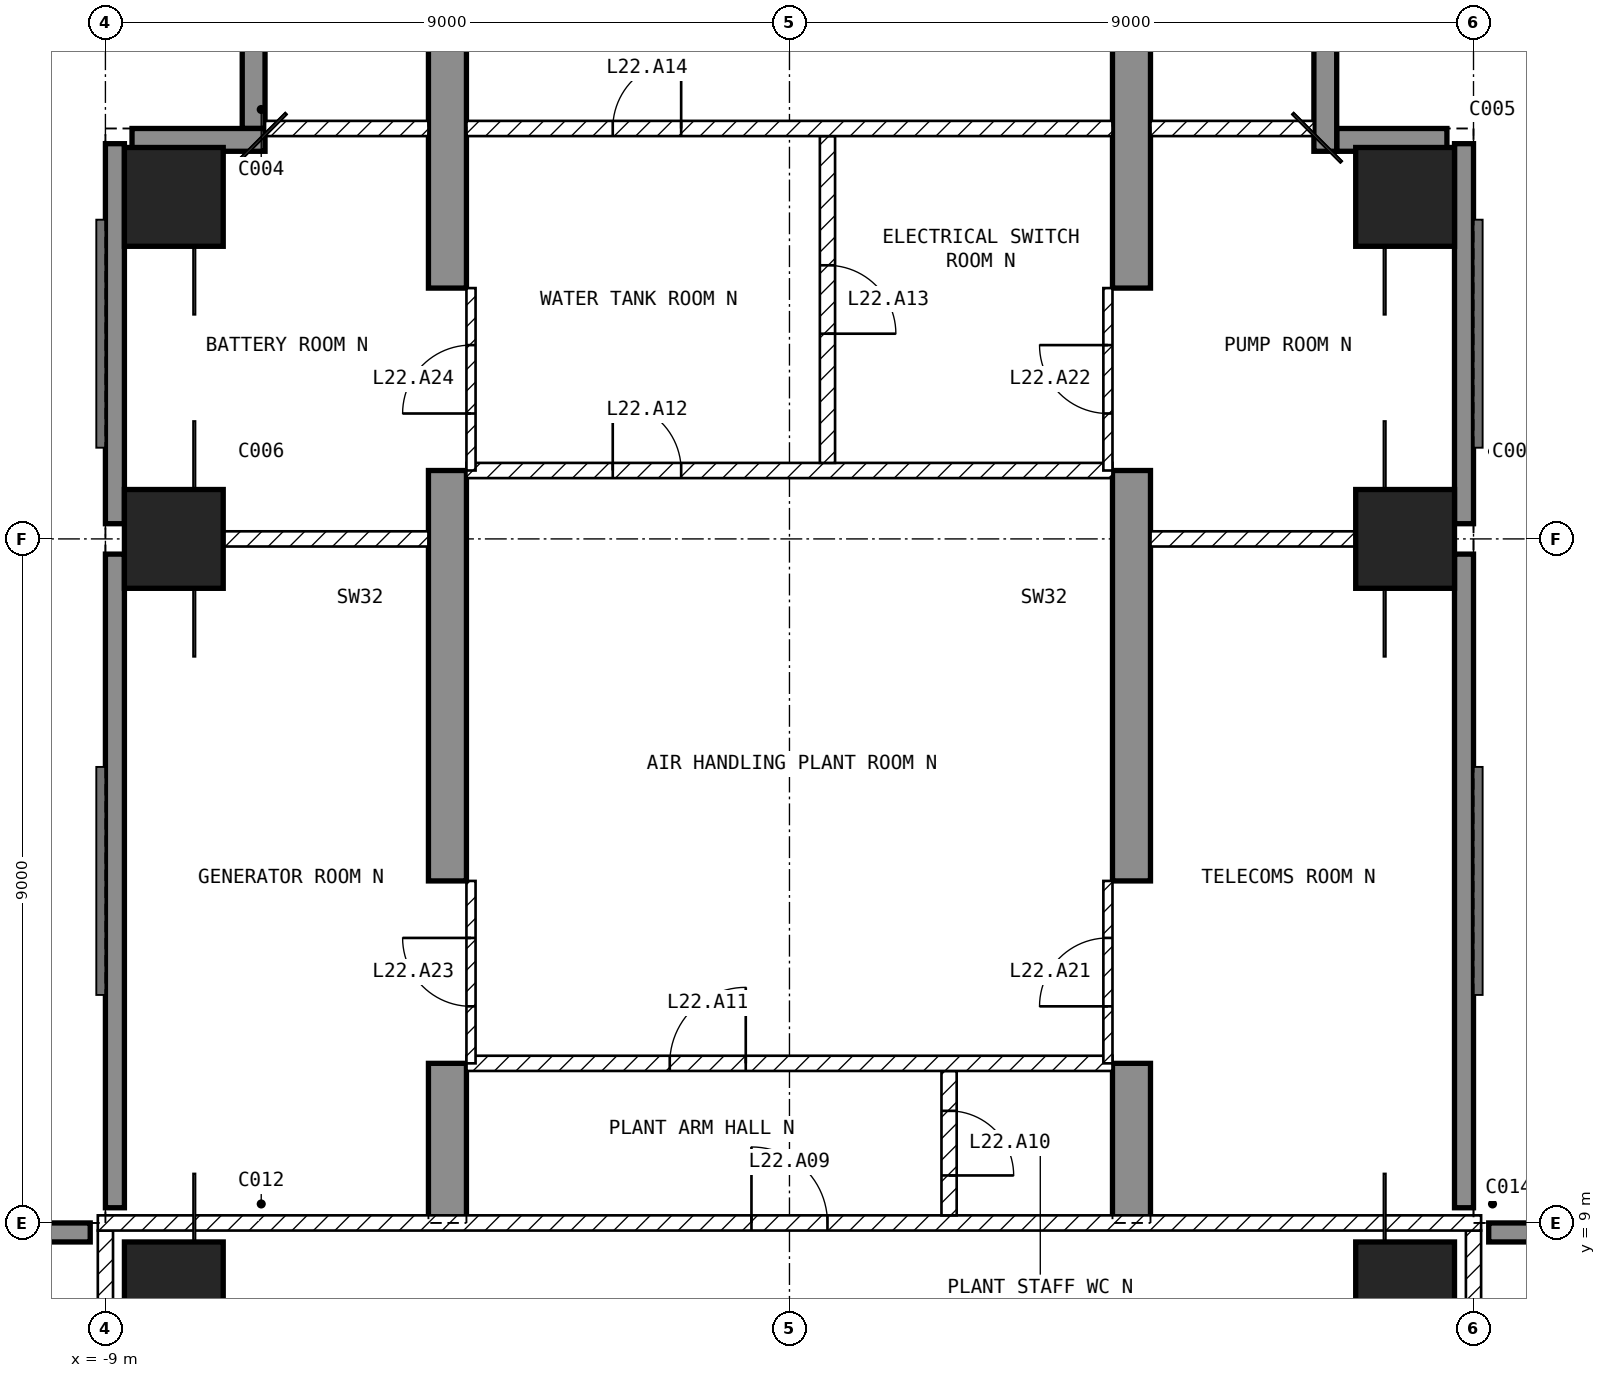
"""IFC4 building model, lengths in metres.
Left out: names, types, materials, properties, quantities, classifications, styles, units other than length and angle.
Written with IfcOpenShell. Run it as: python <this file> out.ifc"""

import sys

from ifc_helpers import new_model, si_unit, direction, frame, frame_2d, origin, origin_2d, place, context, subcontext, project, spatial, polyline, rectangle, outline, extrude, element, fill, save


model = new_model("IFC4")
c1 = context("Model", 3, precision=1e-05, world=origin(), true_north=direction((0.0, 1.0)))
c2 = subcontext(c1, "Body", "Model", "MODEL_VIEW")
j1 = project(units=[si_unit("LENGTHUNIT", "METRE"), si_unit("PLANEANGLEUNIT", "RADIAN")], contexts=[c1])
p1 = place(None, origin())
s1 = spatial("IfcSite", under=j1, at=p1, CompositionType="ELEMENT")
p2 = place(p1, origin())
s2 = spatial("IfcBuilding", under=s1, at=p2, CompositionType="ELEMENT")
p3 = place(p2, frame((0.0, 0.0, 97.9)))
s3 = spatial("IfcBuildingStorey", under=s2, at=p3, CompositionType="ELEMENT", Elevation=97.9)
for number, where, z_axis, x_axis in (
    (1, (-8.1, 8.1, -0.45), (0.0, 0.0, 1.0), (1.0, 0.0, 0.0)),
    (2, (-8.1, 18.0, -0.45), (0.0, 0.0, 1.0), (1.0, 0.0, 0.0)),
    (3, (-8.1, 22.5, -0.45), (0.0, 0.0, 1.0), (1.0, 0.0, 0.0)),
    (4, (8.1, 8.1, -0.45), (0.0, 0.0, 1.0), (1.0, 0.0, 0.0)),
    (5, (8.1, 18.0, -0.45), (0.0, 0.0, 1.0), (1.0, 0.0, 0.0)),
    (6, (8.1, 22.5, -0.45), (0.0, 0.0, 1.0), (1.0, 0.0, 0.0)),
):
    element("IfcColumn", number, at=place(p3, frame(where, z_axis=z_axis, x_axis=x_axis)), inside=s3, PredefinedType="COLUMN", context=c2, shape_type="SweptSolid", body=[
        extrude(rectangle(XDim=1.3, YDim=1.3, at=origin_2d()), origin(), (0.0, 0.0, 1.0), 4.7),
    ])
for number, where, z_axis, x_axis in (
    (7, (-4.75, 9.0, -0.45), (1.0, 0.0, 0.0), (0.0, 1.0, 0.0)),
    (8, (4.25, 9.0, -0.45), (1.0, 0.0, 0.0), (0.0, 1.0, 0.0)),
):
    element("IfcWall", number, at=place(p3, frame(where, z_axis=z_axis, x_axis=x_axis)), inside=s3, PredefinedType="SHEAR", context=c2, shape_type="SweptSolid", body=[
        extrude(outline(polyline([(0.0, 0.0), (2.1, 0.0), (2.1, 2.85), (4.5, 2.85), (4.5, 0.0), (9.9, 0.0), (9.9, 2.85), (12.3, 2.85), (12.3, 0.0), (16.45, 0.0), (16.45, 4.7), (0.0, 4.7), (0.0, 0.0)])), origin(), (0.0, 0.0, 1.0), 0.5),
    ])
for number, where, z_axis, x_axis in (
    (9, (17.8, 8.875, 0.0), (0.0, 0.0, 1.0), (-1.0, 0.0, 0.0)),
    (10, (8.875, 9.2, 0.0), (0.0, 0.0, 1.0), (0.0, 1.0, 0.0)),
):
    element("IfcWall", number, at=place(p3, frame(where, z_axis=z_axis, x_axis=x_axis)), inside=s3, PredefinedType="SOLIDWALL", context=c2, shape_type="SweptSolid", body=[
        extrude(rectangle(XDim=8.6, YDim=0.25, at=frame_2d((4.3, 0.0))), origin(), (0.0, 0.0, 1.0), 4.25),
    ])
for number, where, z_axis, x_axis in (
    (11, (8.875, 18.2, 0.0), (0.0, 0.0, 1.0), (0.0, 1.0, 0.0)),
    (12, (-8.875, 23.2, 0.0), (0.0, 0.0, 1.0), (0.0, -1.0, 0.0)),
):
    element("IfcWall", number, at=place(p3, frame(where, z_axis=z_axis, x_axis=x_axis)), inside=s3, PredefinedType="SOLIDWALL", context=c2, shape_type="SweptSolid", body=[
        extrude(rectangle(XDim=5.0, YDim=0.25, at=frame_2d((2.5, 0.0))), origin(), (0.0, 0.0, 1.0), 4.25),
    ])
for number, where, z_axis, x_axis in (
    (13, (-8.875, 17.8, 0.0), (0.0, 0.0, 1.0), (0.0, -1.0, 0.0)),
    (14, (-9.2, 8.875, 0.0), (0.0, 0.0, 1.0), (-1.0, 0.0, 0.0)),
):
    element("IfcWall", number, at=place(p3, frame(where, z_axis=z_axis, x_axis=x_axis)), inside=s3, PredefinedType="SOLIDWALL", context=c2, shape_type="SweptSolid", body=[
        extrude(rectangle(XDim=8.6, YDim=0.25, at=frame_2d((4.3, 0.0))), origin(), (0.0, 0.0, 1.0), 4.25),
    ])
p4 = place(p3, frame((8.65, 23.25, 0.0), z_axis=(0.0, 0.0, 1.0), x_axis=(-1.0, 0.0, 0.0)))
e15 = element("IfcWall", 15, at=p4, inside=s3, PredefinedType="SOLIDWALL", context=c2, shape_type="SweptSolid", body=[
    extrude(rectangle(XDim=1.45, YDim=0.3, at=frame_2d((0.725, 0.0))), origin(), (0.0, 0.0, 1.0), 4.25),
])
p5 = place(p3, frame((7.05, 23.1, 0.0), z_axis=(0.0, 0.0, 1.0), x_axis=(0.0, 1.0, 0.0)))
e16 = element("IfcWall", 16, at=p5, inside=s3, PredefinedType="SOLIDWALL", context=c2, shape_type="SweptSolid", body=[
    extrude(rectangle(XDim=1.8, YDim=0.3, at=frame_2d((0.9, 0.0))), origin(), (0.0, 0.0, 1.0), 4.25),
])
p6 = place(p3, frame((-7.05, 25.2, 0.0), z_axis=(0.0, 0.0, 1.0), x_axis=(0.0, -1.0, 0.0)))
e17 = element("IfcWall", 17, at=p6, inside=s3, PredefinedType="SOLIDWALL", context=c2, shape_type="SweptSolid", body=[
    extrude(rectangle(XDim=1.8, YDim=0.3, at=frame_2d((0.9, 0.0))), origin(), (0.0, 0.0, 1.0), 4.25),
])
p7 = place(p3, frame((-6.9, 23.25, 0.0), z_axis=(0.0, 0.0, 1.0), x_axis=(-1.0, 0.0, 0.0)))
e18 = element("IfcWall", 18, at=p7, inside=s3, PredefinedType="SOLIDWALL", context=c2, shape_type="SweptSolid", body=[
    extrude(rectangle(XDim=1.75, YDim=0.3, at=frame_2d((0.875, 0.0))), origin(), (0.0, 0.0, 1.0), 4.25),
])
for number, where, z_axis, x_axis in (
    (19, (9.0, 8.9, 0.0), (0.0, 0.0, 1.0), (0.0, -1.0, 0.0)),
    (20, (-9.0, 1.3, 0.0), (0.0, 0.0, 1.0), (0.0, 1.0, 0.0)),
):
    element("IfcWall", number, at=place(p3, frame(where, z_axis=z_axis, x_axis=x_axis)), inside=s3, PredefinedType="PARTITIONING", context=c2, shape_type="SweptSolid", body=[
        extrude(rectangle(XDim=7.6, YDim=0.2, at=frame_2d((3.8, 0.0))), origin(), (0.0, 0.0, 1.0), 4.25),
    ])
p8 = place(p3, frame((-9.1, 9.0, 0.0), z_axis=(0.0, 0.0, 1.0), x_axis=(1.0, 0.0, 0.0)))
e21 = element("IfcWall", 21, at=p8, inside=s3, PredefinedType="PARTITIONING", context=c2, shape_type="SweptSolid", body=[
    extrude(rectangle(XDim=18.2, YDim=0.2, at=frame_2d((9.1, 0.0))), origin(), (0.0, 0.0, 1.0), 4.25),
])
p9 = place(p8, frame((8.6, 0.0, 0.0)))
e22 = element("IfcOpeningElement", 22, at=p9, cuts=e21, PredefinedType="OPENING", context=c2, shape_type="SweptSolid", body=[
    extrude(rectangle(XDim=1.0, YDim=2.1, at=frame_2d((0.5, 1.05))), frame((0.0, 0.11, 0.0), z_axis=(0.0, -1.0, 0.0), x_axis=(1.0, 0.0, 0.0)), (0.0, 0.0, 1.0), 0.22),
])
p10 = place(p3, frame((2.1, 11.0, 0.0), z_axis=(0.0, 0.0, 1.0), x_axis=(0.0, -1.0, 0.0)))
e23 = element("IfcWall", 23, at=p10, inside=s3, PredefinedType="PARTITIONING", context=c2, shape_type="SweptSolid", body=[
    extrude(rectangle(XDim=1.9, YDim=0.2, at=frame_2d((0.95, 0.0))), origin(), (0.0, 0.0, 1.0), 4.25),
])
p11 = place(p10, frame((0.525, 0.0, 0.0)))
e24 = element("IfcOpeningElement", 24, at=p11, cuts=e23, PredefinedType="OPENING", context=c2, shape_type="SweptSolid", body=[
    extrude(rectangle(XDim=0.85, YDim=2.1, at=frame_2d((0.425, 1.05))), frame((0.0, 0.11, 0.0), z_axis=(0.0, -1.0, 0.0), x_axis=(1.0, 0.0, 0.0)), (0.0, 0.0, 1.0), 0.22),
])
p12 = place(p3, frame((-4.25, 11.1, 0.0), z_axis=(0.0, 0.0, 1.0), x_axis=(1.0, 0.0, 0.0)))
e25 = element("IfcWall", 25, at=p12, inside=s3, PredefinedType="PARTITIONING", context=c2, shape_type="SweptSolid", body=[
    extrude(rectangle(XDim=8.5, YDim=0.2, at=frame_2d((4.25, 0.0))), origin(), (0.0, 0.0, 1.0), 4.25),
])
p13 = place(p12, frame((2.675, 0.0, 0.0)))
e26 = element("IfcOpeningElement", 26, at=p13, cuts=e25, PredefinedType="OPENING", context=c2, shape_type="SweptSolid", body=[
    extrude(rectangle(XDim=1.0, YDim=2.1, at=frame_2d((0.5, 1.05))), frame((0.0, 0.11, 0.0), z_axis=(0.0, -1.0, 0.0), x_axis=(1.0, 0.0, 0.0)), (0.0, 0.0, 1.0), 0.22),
])
p14 = place(p3, frame((-4.25, 18.9, 0.0), z_axis=(0.0, 0.0, 1.0), x_axis=(1.0, 0.0, 0.0)))
e27 = element("IfcWall", 27, at=p14, inside=s3, PredefinedType="PARTITIONING", context=c2, shape_type="SweptSolid", body=[
    extrude(rectangle(XDim=8.5, YDim=0.2, at=frame_2d((4.25, 0.0))), origin(), (0.0, 0.0, 1.0), 4.25),
])
p15 = place(p14, frame((1.925, 0.0, 0.0)))
e28 = element("IfcOpeningElement", 28, at=p15, cuts=e27, PredefinedType="OPENING", context=c2, shape_type="SweptSolid", body=[
    extrude(rectangle(XDim=0.9, YDim=2.1, at=frame_2d((0.45, 1.05))), frame((0.0, 0.11, 0.0), z_axis=(0.0, -1.0, 0.0), x_axis=(1.0, 0.0, 0.0)), (0.0, 0.0, 1.0), 0.22),
])
p16 = place(p3, frame((0.5, 23.3, 0.0), z_axis=(0.0, 0.0, 1.0), x_axis=(0.0, -1.0, 0.0)))
e29 = element("IfcWall", 29, at=p16, inside=s3, PredefinedType="PARTITIONING", context=c2, shape_type="SweptSolid", body=[
    extrude(rectangle(XDim=4.3, YDim=0.2, at=frame_2d((2.15, 0.0))), origin(), (0.0, 0.0, 1.0), 4.25),
])
p17 = place(p16, frame((1.7, 0.0, 0.0)))
e30 = element("IfcOpeningElement", 30, at=p17, cuts=e29, PredefinedType="OPENING", context=c2, shape_type="SweptSolid", body=[
    extrude(rectangle(XDim=0.9, YDim=2.1, at=frame_2d((0.45, 1.05))), frame((0.0, 0.11, 0.0), z_axis=(0.0, -1.0, 0.0), x_axis=(1.0, 0.0, 0.0)), (0.0, 0.0, 1.0), 0.22),
])
p18 = place(p3, frame((-4.25, 23.4, 0.0), z_axis=(0.0, 0.0, 1.0), x_axis=(1.0, 0.0, 0.0)))
e31 = element("IfcWall", 31, at=p18, inside=s3, PredefinedType="PARTITIONING", context=c2, shape_type="SweptSolid", body=[
    extrude(rectangle(XDim=8.5, YDim=0.2, at=frame_2d((4.25, 0.0))), origin(), (0.0, 0.0, 1.0), 4.25),
])
p19 = place(p18, frame((1.925, 0.0, 0.0)))
e32 = element("IfcOpeningElement", 32, at=p19, cuts=e31, PredefinedType="OPENING", context=c2, shape_type="SweptSolid", body=[
    extrude(rectangle(XDim=0.9, YDim=2.1, at=frame_2d((0.45, 1.05))), frame((0.0, 0.11, 0.0), z_axis=(0.0, -1.0, 0.0), x_axis=(1.0, 0.0, 0.0)), (0.0, 0.0, 1.0), 0.22),
])
p20 = place(p3, frame((4.75, 18.0, 0.0), z_axis=(0.0, 0.0, 1.0), x_axis=(1.0, 0.0, 0.0)))
e33 = element("IfcWall", 33, at=p20, inside=s3, PredefinedType="PARTITIONING", context=c2, shape_type="SweptSolid", body=[
    extrude(rectangle(XDim=2.7, YDim=0.2, at=frame_2d((1.35, 0.0))), origin(), (0.0, 0.0, 1.0), 3.414),
])
p21 = place(p3, frame((4.75, 23.4, 0.0), z_axis=(0.0, 0.0, 1.0), x_axis=(1.0, 0.0, 0.0)))
e34 = element("IfcWall", 34, at=p21, inside=s3, PredefinedType="PARTITIONING", context=c2, shape_type="SweptSolid", body=[
    extrude(rectangle(XDim=2.15, YDim=0.2, at=frame_2d((1.075, 0.0))), origin(), (0.0, 0.0, 1.0), 4.25),
])
p22 = place(p3, frame((-7.45, 18.0, 0.0), z_axis=(0.0, 0.0, 1.0), x_axis=(1.0, 0.0, 0.0)))
e35 = element("IfcWall", 35, at=p22, inside=s3, PredefinedType="PARTITIONING", context=c2, shape_type="SweptSolid", body=[
    extrude(rectangle(XDim=2.7, YDim=0.2, at=frame_2d((1.35, 0.0))), origin(), (0.0, 0.0, 1.0), 3.414),
])
p23 = place(p3, frame((-6.9, 23.4, 0.0), z_axis=(0.0, 0.0, 1.0), x_axis=(1.0, 0.0, 0.0)))
e36 = element("IfcWall", 36, at=p23, inside=s3, PredefinedType="PARTITIONING", context=c2, shape_type="SweptSolid", body=[
    extrude(rectangle(XDim=2.15, YDim=0.2, at=frame_2d((1.075, 0.0))), origin(), (0.0, 0.0, 1.0), 4.25),
])
p24 = place(p3, frame((4.19, 11.1, 0.0), z_axis=(0.0, 0.0, 1.0), x_axis=(0.0, 1.0, 0.0)))
e37 = element("IfcWall", 37, at=p24, inside=s3, PredefinedType="PARTITIONING", context=c2, shape_type="SweptSolid", body=[
    extrude(rectangle(XDim=2.4, YDim=0.12, at=frame_2d((1.2, 0.0))), origin(), (0.0, 0.0, 1.0), 2.4),
])
p25 = place(p24, frame((0.75, 0.0, 0.0)))
e38 = element("IfcOpeningElement", 38, at=p25, cuts=e37, PredefinedType="OPENING", context=c2, shape_type="SweptSolid", body=[
    extrude(rectangle(XDim=0.9, YDim=2.1, at=frame_2d((0.45, 1.05))), frame((0.0, 0.07, 0.0), z_axis=(0.0, -1.0, 0.0), x_axis=(1.0, 0.0, 0.0)), (0.0, 0.0, 1.0), 0.14),
])
p26 = place(p3, frame((4.19, 18.9, 0.0), z_axis=(0.0, 0.0, 1.0), x_axis=(0.0, 1.0, 0.0)))
e39 = element("IfcWall", 39, at=p26, inside=s3, PredefinedType="PARTITIONING", context=c2, shape_type="SweptSolid", body=[
    extrude(rectangle(XDim=2.4, YDim=0.12, at=frame_2d((1.2, 0.0))), origin(), (0.0, 0.0, 1.0), 2.4),
])
p27 = place(p26, frame((0.75, 0.0, 0.0)))
e40 = element("IfcOpeningElement", 40, at=p27, cuts=e39, PredefinedType="OPENING", context=c2, shape_type="SweptSolid", body=[
    extrude(rectangle(XDim=0.9, YDim=2.1, at=frame_2d((0.45, 1.05))), frame((0.0, 0.07, 0.0), z_axis=(0.0, -1.0, 0.0), x_axis=(1.0, 0.0, 0.0)), (0.0, 0.0, 1.0), 0.14),
])
p28 = place(p3, frame((-4.19, 11.1, 0.0), z_axis=(0.0, 0.0, 1.0), x_axis=(0.0, 1.0, 0.0)))
e41 = element("IfcWall", 41, at=p28, inside=s3, PredefinedType="PARTITIONING", context=c2, shape_type="SweptSolid", body=[
    extrude(rectangle(XDim=2.4, YDim=0.12, at=frame_2d((1.2, 0.0))), origin(), (0.0, 0.0, 1.0), 2.4),
])
p29 = place(p28, frame((0.75, 0.0, 0.0)))
e42 = element("IfcOpeningElement", 42, at=p29, cuts=e41, PredefinedType="OPENING", context=c2, shape_type="SweptSolid", body=[
    extrude(rectangle(XDim=0.9, YDim=2.1, at=frame_2d((0.45, 1.05))), frame((0.0, 0.07, 0.0), z_axis=(0.0, -1.0, 0.0), x_axis=(1.0, 0.0, 0.0)), (0.0, 0.0, 1.0), 0.14),
])
p30 = place(p3, frame((-4.19, 18.9, 0.0), z_axis=(0.0, 0.0, 1.0), x_axis=(0.0, 1.0, 0.0)))
e43 = element("IfcWall", 43, at=p30, inside=s3, PredefinedType="PARTITIONING", context=c2, shape_type="SweptSolid", body=[
    extrude(rectangle(XDim=2.4, YDim=0.12, at=frame_2d((1.2, 0.0))), origin(), (0.0, 0.0, 1.0), 2.4),
])
p31 = place(p30, frame((0.75, 0.0, 0.0)))
e44 = element("IfcOpeningElement", 44, at=p31, cuts=e43, PredefinedType="OPENING", context=c2, shape_type="SweptSolid", body=[
    extrude(rectangle(XDim=0.9, YDim=2.1, at=frame_2d((0.45, 1.05))), frame((0.0, 0.07, 0.0), z_axis=(0.0, -1.0, 0.0), x_axis=(1.0, 0.0, 0.0)), (0.0, 0.0, 1.0), 0.14),
])
p32 = place(p9, origin())
e45 = element("IfcDoor", 45, at=p32, inside=s3, OperationType="SINGLE_SWING_LEFT", PredefinedType="DOOR", context=c2, shape_type="SweptSolid", body=[
    extrude(rectangle(XDim=1.0, YDim=2.1, at=frame_2d((0.5, 1.05))), frame((0.0, 0.025, 0.0), z_axis=(0.0, -1.0, 0.0), x_axis=(1.0, 0.0, 0.0)), (0.0, 0.0, 1.0), 0.05),
])
fill(e22, e45)
p33 = place(p11, origin())
e46 = element("IfcDoor", 46, at=p33, inside=s3, OperationType="SINGLE_SWING_RIGHT", PredefinedType="DOOR", context=c2, shape_type="SweptSolid", body=[
    extrude(rectangle(XDim=0.85, YDim=2.1, at=frame_2d((0.425, 1.05))), frame((0.0, 0.025, 0.0), z_axis=(0.0, -1.0, 0.0), x_axis=(1.0, 0.0, 0.0)), (0.0, 0.0, 1.0), 0.05),
])
fill(e24, e46)
p34 = place(p13, origin())
e47 = element("IfcDoor", 47, at=p34, inside=s3, OperationType="SINGLE_SWING_RIGHT", PredefinedType="DOOR", context=c2, shape_type="SweptSolid", body=[
    extrude(rectangle(XDim=1.0, YDim=2.1, at=frame_2d((0.5, 1.05))), frame((0.0, 0.025, 0.0), z_axis=(0.0, -1.0, 0.0), x_axis=(1.0, 0.0, 0.0)), (0.0, 0.0, 1.0), 0.05),
])
fill(e26, e47)
p35 = place(p15, origin())
e48 = element("IfcDoor", 48, at=p35, inside=s3, OperationType="SINGLE_SWING_LEFT", PredefinedType="DOOR", context=c2, shape_type="SweptSolid", body=[
    extrude(rectangle(XDim=0.9, YDim=2.1, at=frame_2d((0.45, 1.05))), frame((0.0, 0.025, 0.0), z_axis=(0.0, -1.0, 0.0), x_axis=(1.0, 0.0, 0.0)), (0.0, 0.0, 1.0), 0.05),
])
fill(e28, e48)
p36 = place(p17, origin())
e49 = element("IfcDoor", 49, at=p36, inside=s3, OperationType="SINGLE_SWING_RIGHT", PredefinedType="DOOR", context=c2, shape_type="SweptSolid", body=[
    extrude(rectangle(XDim=0.9, YDim=2.1, at=frame_2d((0.45, 1.05))), frame((0.0, 0.025, 0.0), z_axis=(0.0, -1.0, 0.0), x_axis=(1.0, 0.0, 0.0)), (0.0, 0.0, 1.0), 0.05),
])
fill(e30, e49)
p37 = place(p19, origin())
e50 = element("IfcDoor", 50, at=p37, inside=s3, OperationType="SINGLE_SWING_RIGHT", PredefinedType="DOOR", context=c2, shape_type="SweptSolid", body=[
    extrude(rectangle(XDim=0.9, YDim=2.1, at=frame_2d((0.45, 1.05))), frame((0.0, 0.025, 0.0), z_axis=(0.0, -1.0, 0.0), x_axis=(1.0, 0.0, 0.0)), (0.0, 0.0, 1.0), 0.05),
])
fill(e32, e50)
p38 = place(p25, origin())
e51 = element("IfcDoor", 51, at=p38, inside=s3, OperationType="SINGLE_SWING_LEFT", PredefinedType="DOOR", context=c2, shape_type="SweptSolid", body=[
    extrude(rectangle(XDim=0.9, YDim=2.1, at=frame_2d((0.45, 1.05))), frame((0.0, 0.025, 0.0), z_axis=(0.0, -1.0, 0.0), x_axis=(1.0, 0.0, 0.0)), (0.0, 0.0, 1.0), 0.05),
])
fill(e38, e51)
p39 = place(p27, origin())
e52 = element("IfcDoor", 52, at=p39, inside=s3, OperationType="SINGLE_SWING_RIGHT", PredefinedType="DOOR", context=c2, shape_type="SweptSolid", body=[
    extrude(rectangle(XDim=0.9, YDim=2.1, at=frame_2d((0.45, 1.05))), frame((0.0, 0.025, 0.0), z_axis=(0.0, -1.0, 0.0), x_axis=(1.0, 0.0, 0.0)), (0.0, 0.0, 1.0), 0.05),
])
fill(e40, e52)
p40 = place(p29, origin())
e53 = element("IfcDoor", 53, at=p40, inside=s3, OperationType="SINGLE_SWING_RIGHT", PredefinedType="DOOR", context=c2, shape_type="SweptSolid", body=[
    extrude(rectangle(XDim=0.9, YDim=2.1, at=frame_2d((0.45, 1.05))), frame((0.0, 0.025, 0.0), z_axis=(0.0, -1.0, 0.0), x_axis=(1.0, 0.0, 0.0)), (0.0, 0.0, 1.0), 0.05),
])
fill(e42, e53)
p41 = place(p31, origin())
e54 = element("IfcDoor", 54, at=p41, inside=s3, OperationType="SINGLE_SWING_LEFT", PredefinedType="DOOR", context=c2, shape_type="SweptSolid", body=[
    extrude(rectangle(XDim=0.9, YDim=2.1, at=frame_2d((0.45, 1.05))), frame((0.0, 0.025, 0.0), z_axis=(0.0, -1.0, 0.0), x_axis=(1.0, 0.0, 0.0)), (0.0, 0.0, 1.0), 0.05),
])
fill(e44, e54)
save(model, sys.argv[1])
